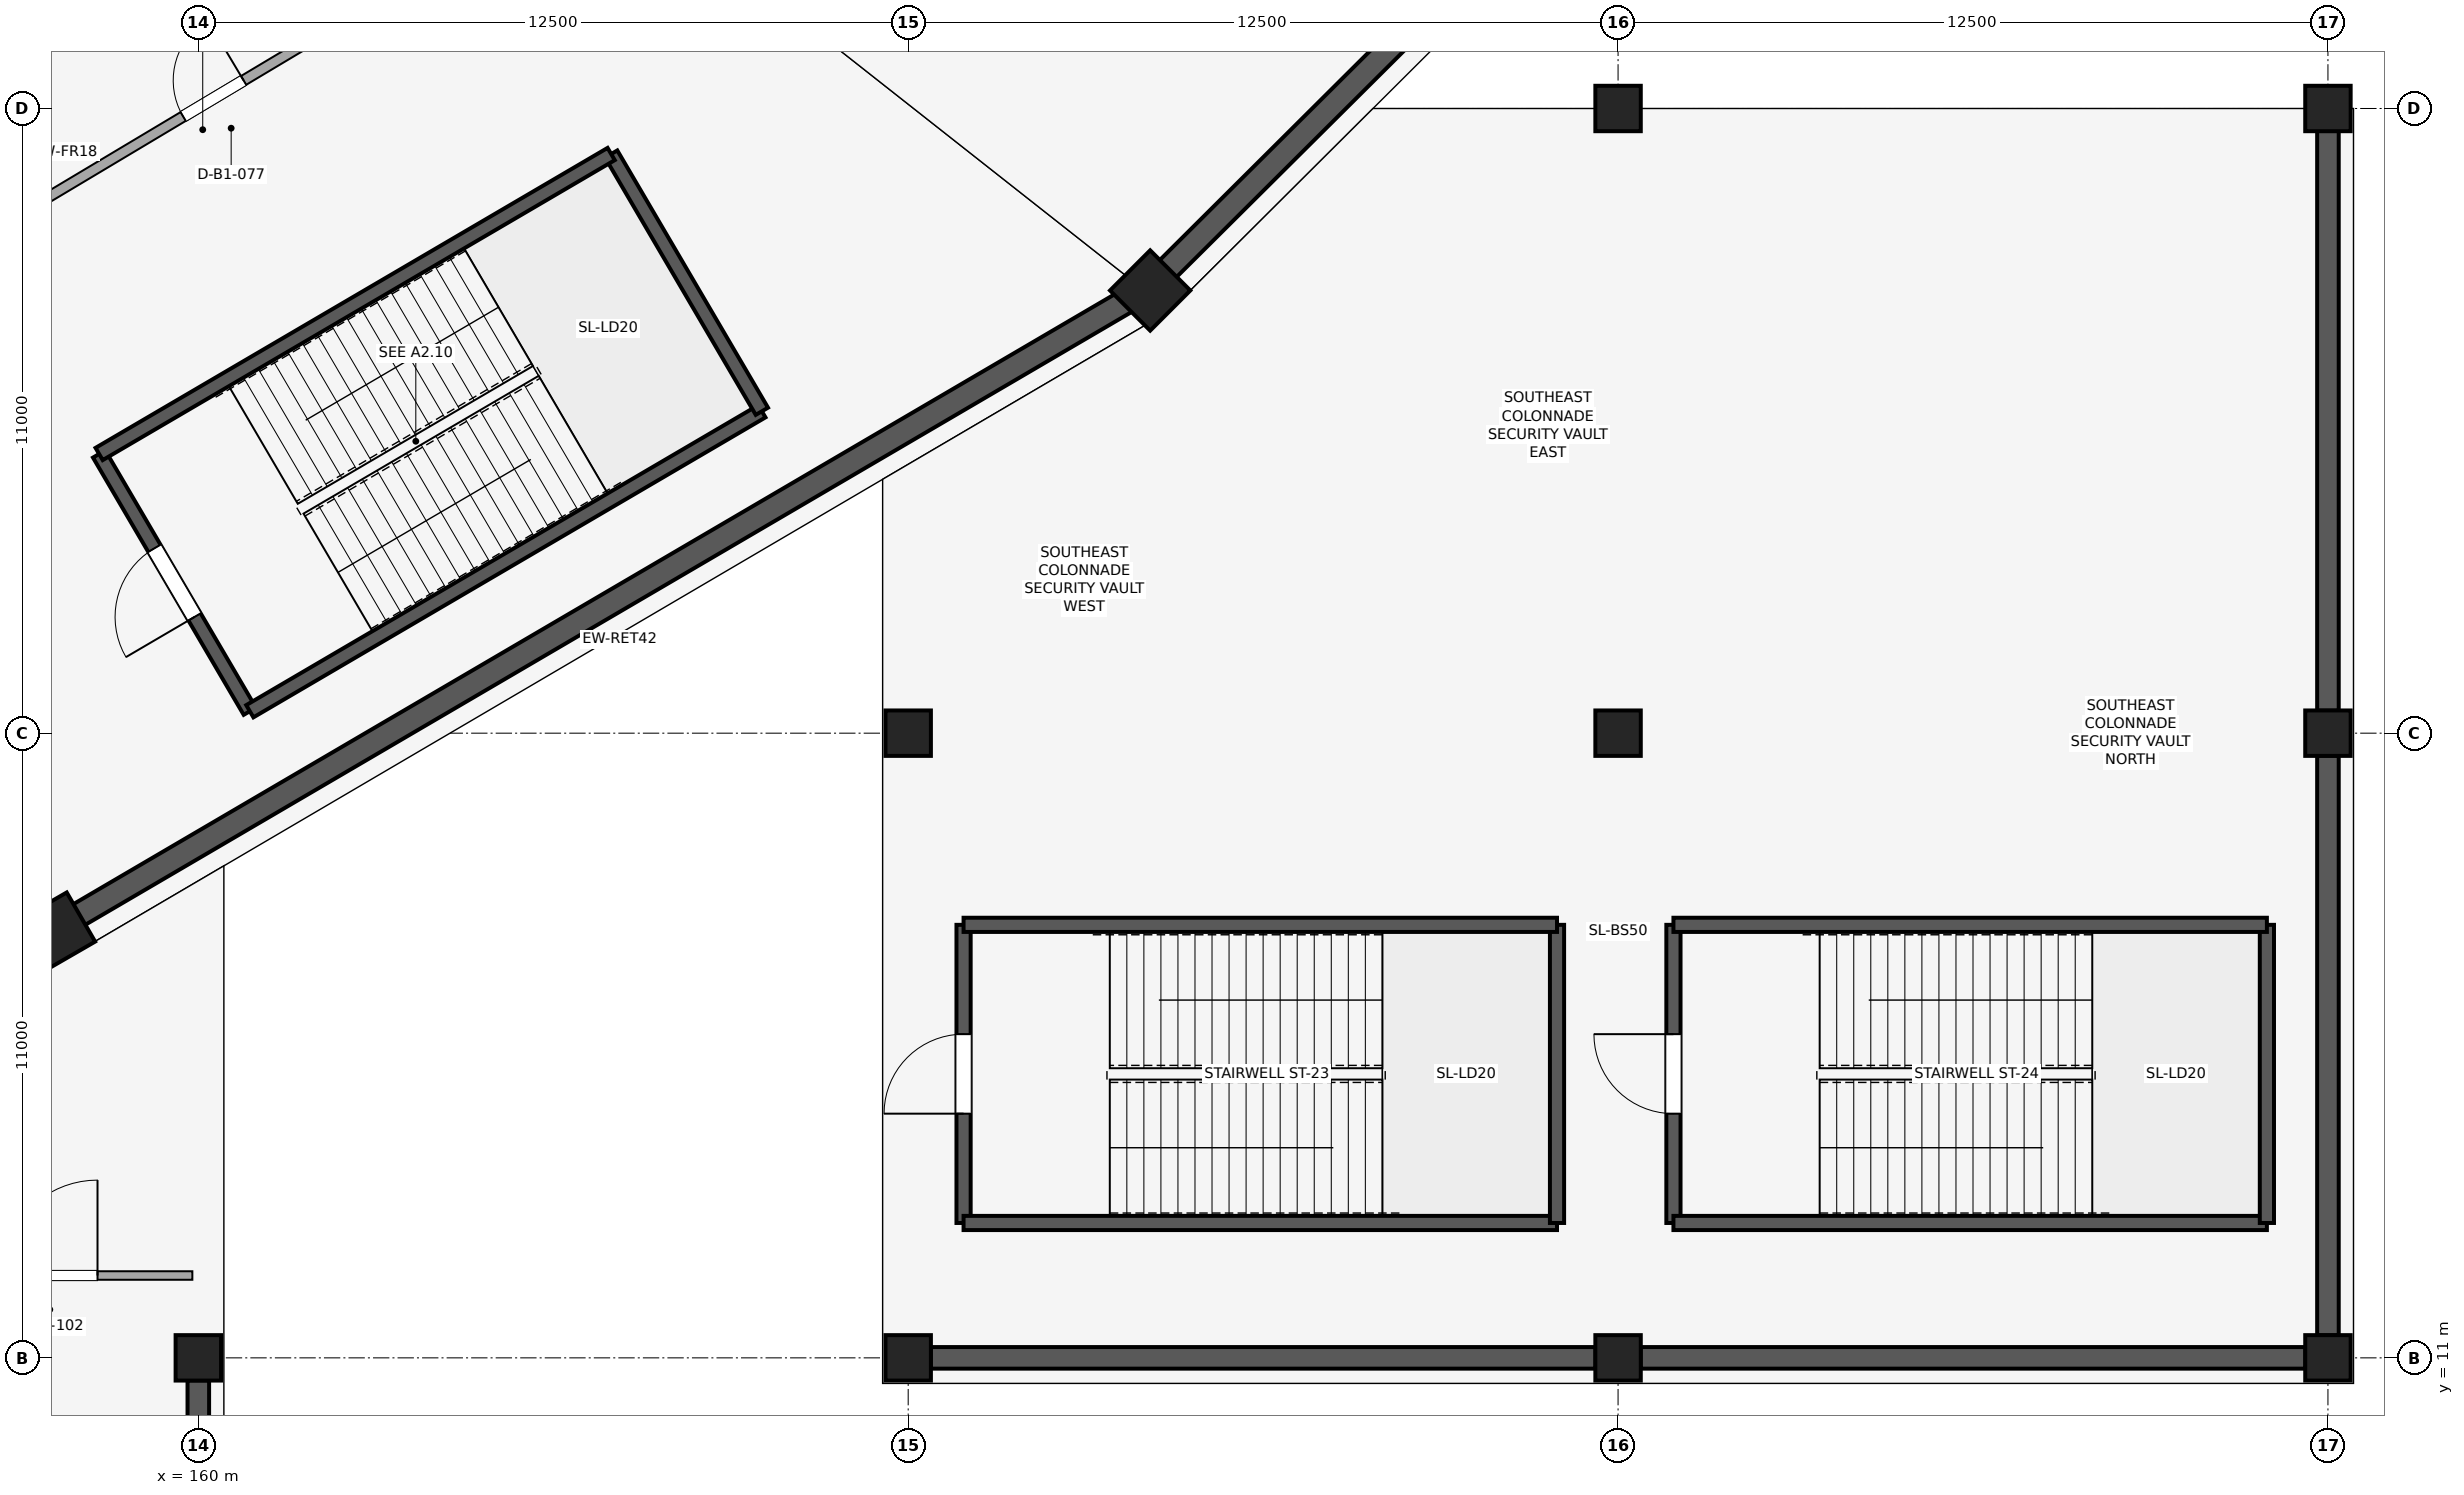
"""IFC4 building model, lengths in metres.
Left out: names, types, materials, properties, quantities, classifications, styles, units other than length and angle.
Written with IfcOpenShell. Run it as: python <this file> out.ifc"""

import sys

from ifc_helpers import new_model, si_unit, direction, frame, frame_2d, origin, origin_2d, place, context, subcontext, project, spatial, rectangle, extrude, element, fill, save


model = new_model("IFC4")
c1 = context("Model", 3, precision=1e-05, world=origin(), true_north=direction((0.0, 1.0)))
c2 = subcontext(c1, "Body", "Model", "MODEL_VIEW")
j1 = project(units=[si_unit("LENGTHUNIT", "METRE"), si_unit("PLANEANGLEUNIT", "RADIAN")], contexts=[c1])
p1 = place(None, origin())
s1 = spatial("IfcSite", under=j1, at=p1, CompositionType="ELEMENT")
p2 = place(p1, origin())
s2 = spatial("IfcBuilding", under=s1, at=p2, CompositionType="ELEMENT")
p3 = place(p2, frame((0.0, 0.0, -5.4)))
s3 = spatial("IfcBuildingStorey", under=s2, at=p3, CompositionType="ELEMENT", Elevation=-5.4)
for number, where, z_axis, x_axis in (
    (1, (157.5, 18.512, 0.0), (0.0, 0.0, 1.0), (0.5, -0.866, 0.0)),
    (2, (176.761, 29.795, 0.0), (0.0, 0.0, 1.0), (0.707, -0.707, 0.0)),
):
    element("IfcColumn", number, at=place(p3, frame(where, z_axis=z_axis, x_axis=x_axis)), inside=s3, PredefinedType="COLUMN", context=c2, shape_type="SweptSolid", body=[
        extrude(rectangle(XDim=1.0, YDim=1.0, at=origin_2d()), origin(), (0.0, 0.0, 1.0), 5.4),
    ])
for number, where, z_axis, x_axis in (
    (3, (160.0, 11.0, 0.0), (0.0, 0.0, 1.0), (1.0, 0.0, 0.0)),
    (4, (172.5, 11.0, 0.0), (0.0, 0.0, 1.0), (1.0, 0.0, 0.0)),
    (5, (172.5, 22.0, 0.0), (0.0, 0.0, 1.0), (1.0, 0.0, 0.0)),
    (6, (185.0, 11.0, 0.0), (0.0, 0.0, 1.0), (1.0, 0.0, 0.0)),
    (7, (185.0, 22.0, 0.0), (0.0, 0.0, 1.0), (1.0, 0.0, 0.0)),
    (8, (185.0, 33.0, 0.0), (0.0, 0.0, 1.0), (1.0, 0.0, 0.0)),
    (9, (197.5, 11.0, 0.0), (0.0, 0.0, 1.0), (1.0, 0.0, 0.0)),
    (10, (197.5, 22.0, 0.0), (0.0, 0.0, 1.0), (1.0, 0.0, 0.0)),
    (11, (197.5, 33.0, 0.0), (0.0, 0.0, 1.0), (1.0, 0.0, 0.0)),
):
    element("IfcColumn", number, at=place(p3, frame(where, z_axis=z_axis, x_axis=x_axis)), inside=s3, PredefinedType="COLUMN", context=c2, shape_type="SweptSolid", body=[
        extrude(rectangle(XDim=0.8, YDim=0.8, at=origin_2d()), origin(), (0.0, 0.0, 1.0), 5.4),
    ])
p4 = place(p3, frame((157.475, 18.555, 0.0), z_axis=(0.0, 0.0, 1.0), x_axis=(0.862881315776, 0.505406603523, 0.0)))
e12 = element("IfcWall", 12, at=p4, inside=s3, PredefinedType="SOLIDWALL", context=c2, shape_type="SweptSolid", body=[
    extrude(rectangle(XDim=22.31, YDim=0.42, at=frame_2d((11.155, 0.0))), origin(), (0.0, 0.0, 1.0), 4.45),
])
p5 = place(p3, frame((176.726, 29.831, 0.0), z_axis=(0.0, 0.0, 1.0), x_axis=(0.708961581499, 0.705247102765, 0.0)))
e13 = element("IfcWall", 13, at=p5, inside=s3, PredefinedType="SOLIDWALL", context=c2, shape_type="SweptSolid", body=[
    extrude(rectangle(XDim=20.835, YDim=0.42, at=frame_2d((10.418, 0.0))), origin(), (0.0, 0.0, 1.0), 4.45),
])
p6 = place(p3, frame((160.0, 0.397, 0.0), z_axis=(0.0, 0.0, 1.0), x_axis=(0.0, 1.0, 0.0)))
e14 = element("IfcWall", 14, at=p6, inside=s3, PredefinedType="SOLIDWALL", context=c2, shape_type="SweptSolid", body=[
    extrude(rectangle(XDim=10.206, YDim=0.38, at=frame_2d((5.103, 0.0))), origin(), (0.0, 0.0, 1.0), 4.43),
])
for number, where, z_axis, x_axis in (
    (15, (172.897, 11.0, 0.0), (0.0, 0.0, 1.0), (1.0, 0.0, 0.0)),
    (16, (185.397, 11.0, 0.0), (0.0, 0.0, 1.0), (1.0, 0.0, 0.0)),
):
    element("IfcWall", number, at=place(p3, frame(where, z_axis=z_axis, x_axis=x_axis)), inside=s3, PredefinedType="SOLIDWALL", context=c2, shape_type="SweptSolid", body=[
        extrude(rectangle(XDim=11.706, YDim=0.38, at=frame_2d((5.853, 0.0))), origin(), (0.0, 0.0, 1.0), 4.43),
    ])
for number, where, z_axis, x_axis in (
    (17, (197.5, 11.397, 0.0), (0.0, 0.0, 1.0), (0.0, 1.0, 0.0)),
    (18, (197.5, 22.397, 0.0), (0.0, 0.0, 1.0), (0.0, 1.0, 0.0)),
):
    element("IfcWall", number, at=place(p3, frame(where, z_axis=z_axis, x_axis=x_axis)), inside=s3, PredefinedType="SOLIDWALL", context=c2, shape_type="SweptSolid", body=[
        extrude(rectangle(XDim=10.206, YDim=0.38, at=frame_2d((5.103, 0.0))), origin(), (0.0, 0.0, 1.0), 4.43),
    ])
p7 = place(p3, frame((158.253, 26.916, 0.0), z_axis=(0.0, 0.0, 1.0), x_axis=(0.505460490551, -0.862849750821, 0.0)))
e19 = element("IfcWall", 19, at=p7, inside=s3, PredefinedType="SHEAR", context=c2, shape_type="SweptSolid", body=[
    extrude(rectangle(XDim=5.25, YDim=0.25, at=frame_2d((2.625, 0.0))), origin(), (0.0, 0.0, 1.0), 5.05),
])
p8 = place(p7, frame((1.925, 0.0, 0.0)))
e20 = element("IfcOpeningElement", 20, at=p8, cuts=e19, PredefinedType="OPENING", context=c2, shape_type="SweptSolid", body=[
    extrude(rectangle(XDim=1.4, YDim=2.2, at=frame_2d((0.7, 1.1))), frame((0.0, 0.135, 0.0), z_axis=(0.0, -1.0, 0.0), x_axis=(1.0, 0.0, 0.0)), (0.0, 0.0, 1.0), 0.27),
])
p9 = place(p3, frame((160.907, 22.386, 0.0), z_axis=(0.0, 0.0, 1.0), x_axis=(0.862854686184, 0.505452065513, 0.0)))
e21 = element("IfcWall", 21, at=p9, inside=s3, PredefinedType="SHEAR", context=c2, shape_type="SweptSolid", body=[
    extrude(rectangle(XDim=10.45, YDim=0.25, at=frame_2d((5.225, 0.0))), origin(), (0.0, 0.0, 1.0), 5.05),
])
p10 = place(p3, frame((169.924, 27.668, 0.0), z_axis=(0.0, 0.0, 1.0), x_axis=(-0.505474830399, 0.862841350327, 0.0)))
e22 = element("IfcWall", 22, at=p10, inside=s3, PredefinedType="SHEAR", context=c2, shape_type="SweptSolid", body=[
    extrude(rectangle(XDim=5.25, YDim=0.25, at=frame_2d((2.625, 0.0))), origin(), (0.0, 0.0, 1.0), 5.05),
])
p11 = place(p3, frame((167.27, 32.198, 0.0), z_axis=(0.0, 0.0, 1.0), x_axis=(-0.862838527648, -0.505479648657, 0.0)))
e23 = element("IfcWall", 23, at=p11, inside=s3, PredefinedType="SHEAR", context=c2, shape_type="SweptSolid", body=[
    extrude(rectangle(XDim=10.45, YDim=0.25, at=frame_2d((5.225, 0.0))), origin(), (0.0, 0.0, 1.0), 5.05),
])
p12 = place(p3, frame((173.475, 18.625, 0.0), z_axis=(0.0, 0.0, 1.0), x_axis=(0.0, -1.0, 0.0)))
e24 = element("IfcWall", 24, at=p12, inside=s3, PredefinedType="SHEAR", context=c2, shape_type="SweptSolid", body=[
    extrude(rectangle(XDim=5.25, YDim=0.25, at=frame_2d((2.625, 0.0))), origin(), (0.0, 0.0, 1.0), 5.05),
])
p13 = place(p12, frame((1.925, 0.0, 0.0)))
e25 = element("IfcOpeningElement", 25, at=p13, cuts=e24, PredefinedType="OPENING", context=c2, shape_type="SweptSolid", body=[
    extrude(rectangle(XDim=1.4, YDim=2.2, at=frame_2d((0.7, 1.1))), frame((0.0, 0.135, 0.0), z_axis=(0.0, -1.0, 0.0), x_axis=(1.0, 0.0, 0.0)), (0.0, 0.0, 1.0), 0.27),
])
p14 = place(p3, frame((173.475, 13.375, 0.0), z_axis=(0.0, 0.0, 1.0), x_axis=(1.0, 0.0, 0.0)))
e26 = element("IfcWall", 26, at=p14, inside=s3, PredefinedType="SHEAR", context=c2, shape_type="SweptSolid", body=[
    extrude(rectangle(XDim=10.45, YDim=0.25, at=frame_2d((5.225, 0.0))), origin(), (0.0, 0.0, 1.0), 5.05),
])
p15 = place(p3, frame((183.925, 13.375, 0.0), z_axis=(0.0, 0.0, 1.0), x_axis=(0.0, 1.0, 0.0)))
e27 = element("IfcWall", 27, at=p15, inside=s3, PredefinedType="SHEAR", context=c2, shape_type="SweptSolid", body=[
    extrude(rectangle(XDim=5.25, YDim=0.25, at=frame_2d((2.625, 0.0))), origin(), (0.0, 0.0, 1.0), 5.05),
])
p16 = place(p3, frame((183.925, 18.625, 0.0), z_axis=(0.0, 0.0, 1.0), x_axis=(-1.0, 0.0, 0.0)))
e28 = element("IfcWall", 28, at=p16, inside=s3, PredefinedType="SHEAR", context=c2, shape_type="SweptSolid", body=[
    extrude(rectangle(XDim=10.45, YDim=0.25, at=frame_2d((5.225, 0.0))), origin(), (0.0, 0.0, 1.0), 5.05),
])
p17 = place(p3, frame((185.975, 18.625, 0.0), z_axis=(0.0, 0.0, 1.0), x_axis=(0.0, -1.0, 0.0)))
e29 = element("IfcWall", 29, at=p17, inside=s3, PredefinedType="SHEAR", context=c2, shape_type="SweptSolid", body=[
    extrude(rectangle(XDim=5.25, YDim=0.25, at=frame_2d((2.625, 0.0))), origin(), (0.0, 0.0, 1.0), 5.05),
])
p18 = place(p17, frame((1.925, 0.0, 0.0)))
e30 = element("IfcOpeningElement", 30, at=p18, cuts=e29, PredefinedType="OPENING", context=c2, shape_type="SweptSolid", body=[
    extrude(rectangle(XDim=1.4, YDim=2.2, at=frame_2d((0.7, 1.1))), frame((0.0, 0.135, 0.0), z_axis=(0.0, -1.0, 0.0), x_axis=(1.0, 0.0, 0.0)), (0.0, 0.0, 1.0), 0.27),
])
p19 = place(p3, frame((185.975, 13.375, 0.0), z_axis=(0.0, 0.0, 1.0), x_axis=(1.0, 0.0, 0.0)))
e31 = element("IfcWall", 31, at=p19, inside=s3, PredefinedType="SHEAR", context=c2, shape_type="SweptSolid", body=[
    extrude(rectangle(XDim=10.45, YDim=0.25, at=frame_2d((5.225, 0.0))), origin(), (0.0, 0.0, 1.0), 5.05),
])
p20 = place(p3, frame((196.425, 13.375, 0.0), z_axis=(0.0, 0.0, 1.0), x_axis=(0.0, 1.0, 0.0)))
e32 = element("IfcWall", 32, at=p20, inside=s3, PredefinedType="SHEAR", context=c2, shape_type="SweptSolid", body=[
    extrude(rectangle(XDim=5.25, YDim=0.25, at=frame_2d((2.625, 0.0))), origin(), (0.0, 0.0, 1.0), 5.05),
])
p21 = place(p3, frame((196.425, 18.625, 0.0), z_axis=(0.0, 0.0, 1.0), x_axis=(-1.0, 0.0, 0.0)))
e33 = element("IfcWall", 33, at=p21, inside=s3, PredefinedType="SHEAR", context=c2, shape_type="SweptSolid", body=[
    extrude(rectangle(XDim=10.45, YDim=0.25, at=frame_2d((5.225, 0.0))), origin(), (0.0, 0.0, 1.0), 5.05),
])
p22 = place(p3, frame((152.572, 28.579, 0.0), z_axis=(0.0, 0.0, 1.0), x_axis=(0.858419328877, 0.512948589831, 0.0)))
e34 = element("IfcWall", 34, at=p22, inside=s3, PredefinedType="PARTITIONING", context=c2, shape_type="SweptSolid", body=[
    extrude(rectangle(XDim=17.925, YDim=0.18, at=frame_2d((8.962, 0.0))), origin(), (0.0, 0.0, 1.0), 3.8),
])
p23 = place(p22, frame((8.342, 0.0, 0.0)))
e35 = element("IfcOpeningElement", 35, at=p23, cuts=e34, PredefinedType="OPENING", context=c2, shape_type="SweptSolid", body=[
    extrude(rectangle(XDim=1.24, YDim=2.38, at=frame_2d((0.62, 1.19))), frame((0.0, 0.1, 0.0), z_axis=(0.0, -1.0, 0.0), x_axis=(1.0, 0.0, 0.0)), (0.0, 0.0, 1.0), 0.2),
])
p24 = place(p3, frame((147.585, 12.45, 0.0), z_axis=(0.0, 0.0, 1.0), x_axis=(1.0, 0.0, 0.0)))
e36 = element("IfcWall", 36, at=p24, inside=s3, PredefinedType="PARTITIONING", context=c2, shape_type="SweptSolid", body=[
    extrude(rectangle(XDim=12.31, YDim=0.15, at=frame_2d((6.155, 0.0))), origin(), (0.0, 0.0, 1.0), 3.8),
])
p25 = place(p24, frame((8.96, 0.0, 0.0)))
e37 = element("IfcOpeningElement", 37, at=p25, cuts=e36, PredefinedType="OPENING", context=c2, shape_type="SweptSolid", body=[
    extrude(rectangle(XDim=1.68, YDim=2.38, at=frame_2d((0.84, 1.19))), frame((0.0, 0.085, 0.0), z_axis=(0.0, -1.0, 0.0), x_axis=(1.0, 0.0, 0.0)), (0.0, 0.0, 1.0), 0.17),
])
p26 = place(p8, frame((1.4, 0.0, 0.0), z_axis=(0.0, 0.0, 1.0), x_axis=(-1.0, 0.0, 0.0)))
e38 = element("IfcDoor", 38, at=p26, inside=s3, OperationType="SINGLE_SWING_LEFT", PredefinedType="DOOR", context=c2, shape_type="SweptSolid", body=[
    extrude(rectangle(XDim=1.4, YDim=2.2, at=frame_2d((0.7, 1.1))), frame((0.0, 0.025, 0.0), z_axis=(0.0, -1.0, 0.0), x_axis=(1.0, 0.0, 0.0)), (0.0, 0.0, 1.0), 0.05),
])
fill(e20, e38)
p27 = place(p13, frame((1.4, 0.0, 0.0), z_axis=(0.0, 0.0, 1.0), x_axis=(-1.0, 0.0, 0.0)))
e39 = element("IfcDoor", 39, at=p27, inside=s3, OperationType="SINGLE_SWING_LEFT", PredefinedType="DOOR", context=c2, shape_type="SweptSolid", body=[
    extrude(rectangle(XDim=1.4, YDim=2.2, at=frame_2d((0.7, 1.1))), frame((0.0, 0.025, 0.0), z_axis=(0.0, -1.0, 0.0), x_axis=(1.0, 0.0, 0.0)), (0.0, 0.0, 1.0), 0.05),
])
fill(e25, e39)
p28 = place(p18, frame((1.4, 0.0, 0.0), z_axis=(0.0, 0.0, 1.0), x_axis=(-1.0, 0.0, 0.0)))
e40 = element("IfcDoor", 40, at=p28, inside=s3, OperationType="SINGLE_SWING_RIGHT", PredefinedType="DOOR", context=c2, shape_type="SweptSolid", body=[
    extrude(rectangle(XDim=1.4, YDim=2.2, at=frame_2d((0.7, 1.1))), frame((0.0, 0.025, 0.0), z_axis=(0.0, -1.0, 0.0), x_axis=(1.0, 0.0, 0.0)), (0.0, 0.0, 1.0), 0.05),
])
fill(e30, e40)
p29 = place(p23, origin())
e41 = element("IfcDoor", 41, at=p29, inside=s3, OperationType="SINGLE_SWING_RIGHT", PredefinedType="DOOR", context=c2, shape_type="SweptSolid", body=[
    extrude(rectangle(XDim=1.24, YDim=2.38, at=frame_2d((0.62, 1.19))), frame((0.0, 0.025, 0.0), z_axis=(0.0, -1.0, 0.0), x_axis=(1.0, 0.0, 0.0)), (0.0, 0.0, 1.0), 0.05),
])
fill(e35, e41)
p30 = place(p25, origin())
e42 = element("IfcDoor", 42, at=p30, inside=s3, OperationType="SINGLE_SWING_RIGHT", PredefinedType="DOOR", context=c2, shape_type="SweptSolid", body=[
    extrude(rectangle(XDim=1.68, YDim=2.38, at=frame_2d((0.84, 1.19))), frame((0.0, 0.025, 0.0), z_axis=(0.0, -1.0, 0.0), x_axis=(1.0, 0.0, 0.0)), (0.0, 0.0, 1.0), 0.05),
])
fill(e37, e42)
save(model, sys.argv[1])
